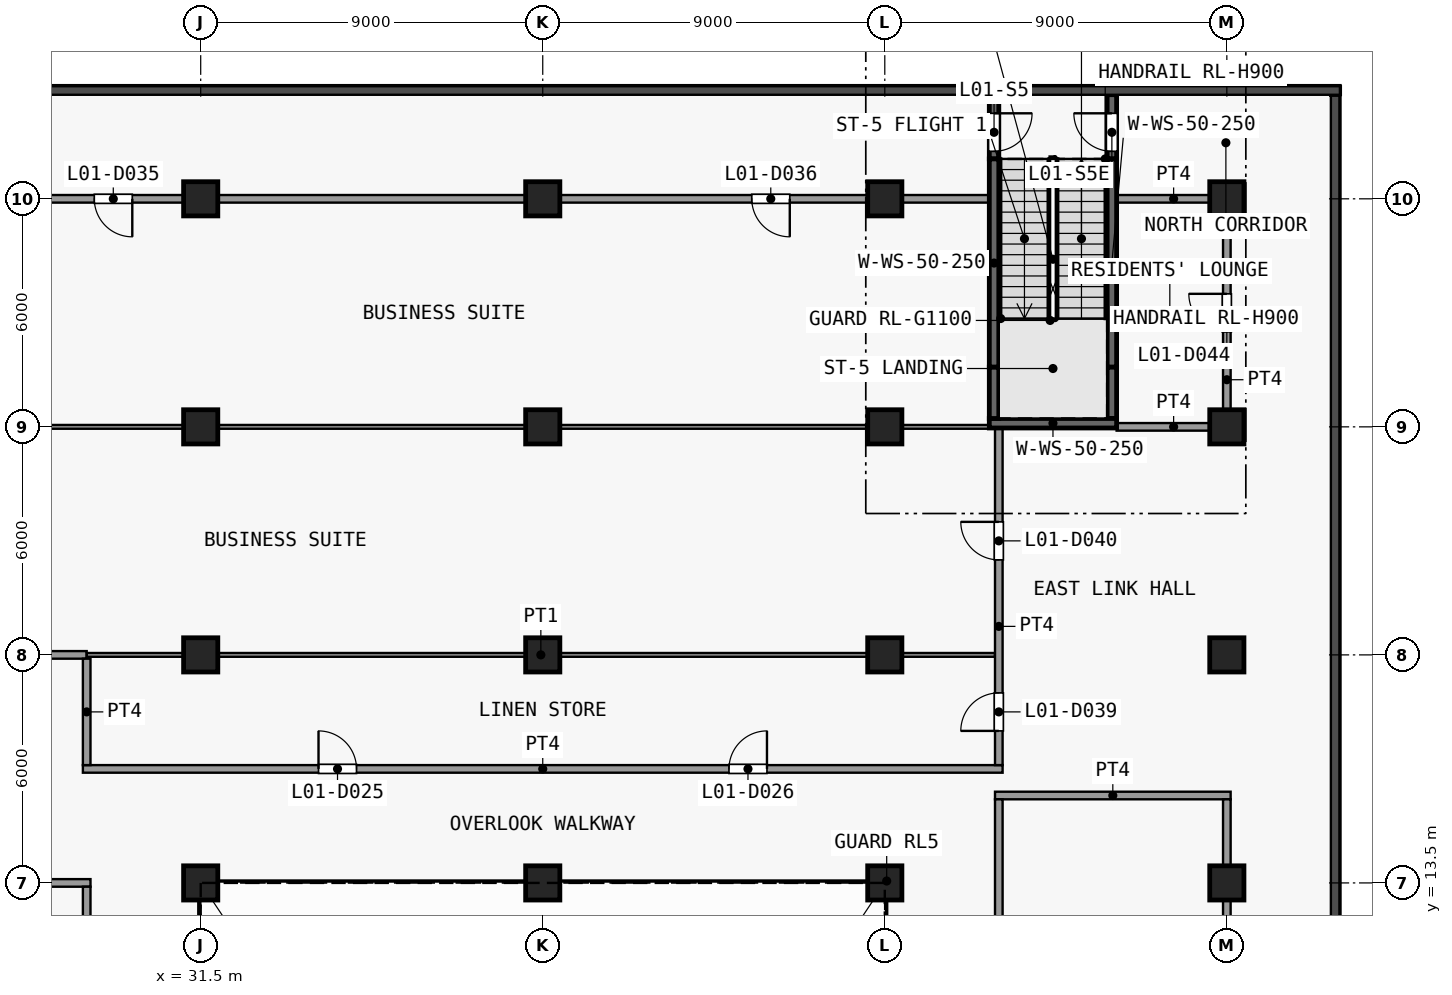
"""IFC4 building model, lengths in metres.
Left out: names, types, materials, properties, quantities, classifications, styles, units other than length and angle.
Written with IfcOpenShell. Run it as: python <this file> out.ifc"""

import sys

from ifc_helpers import new_model, si_unit, direction, frame, frame_2d, origin, origin_2d, place, context, subcontext, project, spatial, rectangle, extrude, element, fill, save


model = new_model("IFC4")
c1 = context("Model", 3, precision=1e-05, world=origin(), true_north=direction((0.0, 1.0)))
c2 = subcontext(c1, "Body", "Model", "MODEL_VIEW")
j1 = project(units=[si_unit("LENGTHUNIT", "METRE"), si_unit("PLANEANGLEUNIT", "RADIAN")], contexts=[c1])
p1 = place(None, origin())
s1 = spatial("IfcSite", under=j1, at=p1, CompositionType="ELEMENT")
p2 = place(p1, origin())
s2 = spatial("IfcBuilding", under=s1, at=p2, CompositionType="ELEMENT")
p3 = place(p2, frame((0.0, 0.0, 8.0)))
s3 = spatial("IfcBuildingStorey", under=s2, at=p3, CompositionType="ELEMENT", Elevation=8.0)
for number, where, z_axis, x_axis in (
    (1, (31.5, 13.5, 0.0), (0.0, 0.0, 1.0), (1.0, 0.0, 0.0)),
    (2, (31.5, 19.5, 0.0), (0.0, 0.0, 1.0), (1.0, 0.0, 0.0)),
    (3, (31.5, 25.5, 0.0), (0.0, 0.0, 1.0), (1.0, 0.0, 0.0)),
    (4, (31.5, 31.5, 0.0), (0.0, 0.0, 1.0), (1.0, 0.0, 0.0)),
    (5, (40.5, 13.5, 0.0), (0.0, 0.0, 1.0), (1.0, 0.0, 0.0)),
    (6, (40.5, 19.5, 0.0), (0.0, 0.0, 1.0), (1.0, 0.0, 0.0)),
    (7, (40.5, 25.5, 0.0), (0.0, 0.0, 1.0), (1.0, 0.0, 0.0)),
    (8, (40.5, 31.5, 0.0), (0.0, 0.0, 1.0), (1.0, 0.0, 0.0)),
    (9, (49.5, 13.5, 0.0), (0.0, 0.0, 1.0), (1.0, 0.0, 0.0)),
    (10, (49.5, 19.5, 0.0), (0.0, 0.0, 1.0), (1.0, 0.0, 0.0)),
    (11, (49.5, 25.5, 0.0), (0.0, 0.0, 1.0), (1.0, 0.0, 0.0)),
    (12, (49.5, 31.5, 0.0), (0.0, 0.0, 1.0), (1.0, 0.0, 0.0)),
    (13, (58.5, 13.5, 0.0), (0.0, 0.0, 1.0), (1.0, 0.0, 0.0)),
    (14, (58.5, 19.5, 0.0), (0.0, 0.0, 1.0), (1.0, 0.0, 0.0)),
    (15, (58.5, 25.5, 0.0), (0.0, 0.0, 1.0), (1.0, 0.0, 0.0)),
    (16, (58.5, 31.5, 0.0), (0.0, 0.0, 1.0), (1.0, 0.0, 0.0)),
):
    element("IfcColumn", number, at=place(p3, frame(where, z_axis=z_axis, x_axis=x_axis)), inside=s3, PredefinedType="COLUMN", context=c2, shape_type="SweptSolid", body=[
        extrude(rectangle(XDim=0.9, YDim=0.9, at=origin_2d()), origin(), (0.0, 0.0, 1.0), 5.5),
    ])
p4 = place(p3, frame((52.375, 34.24, 0.0), z_axis=(0.0, 0.0, 1.0), x_axis=(0.0, -1.0, 0.0)))
e17 = element("IfcWall", 17, at=p4, inside=s3, PredefinedType="SHEAR", context=c2, shape_type="SweptSolid", body=[
    extrude(rectangle(XDim=1.69, YDim=0.25, at=frame_2d((0.845, 0.0))), origin(), (0.0, 0.0, 1.0), 5.15),
])
p5 = place(p4, frame((0.49, 0.0, 0.0)))
e18 = element("IfcOpeningElement", 18, at=p5, cuts=e17, PredefinedType="OPENING", context=c2, shape_type="SweptSolid", body=[
    extrude(rectangle(XDim=1.0, YDim=2.1, at=frame_2d((0.5, 1.05))), frame((0.0, 0.135, 0.0), z_axis=(0.0, -1.0, 0.0), x_axis=(1.0, 0.0, 0.0)), (0.0, 0.0, 1.0), 0.27),
])
p6 = place(p3, frame((52.375, 27.07, 0.0), z_axis=(0.0, 0.0, 1.0), x_axis=(0.0, 1.0, 0.0)))
e19 = element("IfcWall", 19, at=p6, inside=s3, PredefinedType="SHEAR", context=c2, shape_type="SweptSolid", body=[
    extrude(rectangle(XDim=5.48, YDim=0.25, at=frame_2d((2.74, 0.0))), origin(), (0.0, 0.0, 1.0), 5.15),
])
p7 = place(p3, frame((52.375, 25.72, 0.0), z_axis=(0.0, 0.0, 1.0), x_axis=(0.0, 1.0, 0.0)))
e20 = element("IfcWall", 20, at=p7, inside=s3, PredefinedType="SHEAR", context=c2, shape_type="SweptSolid", body=[
    extrude(rectangle(XDim=1.35, YDim=0.25, at=frame_2d((0.675, 0.0))), origin(), (0.0, 0.0, 1.0), 5.15),
])
p8 = place(p3, frame((55.475, 32.55, 0.0), z_axis=(0.0, 0.0, 1.0), x_axis=(0.0, 1.0, 0.0)))
e21 = element("IfcWall", 21, at=p8, inside=s3, PredefinedType="SHEAR", context=c2, shape_type="SweptSolid", body=[
    extrude(rectangle(XDim=1.69, YDim=0.25, at=frame_2d((0.845, 0.0))), origin(), (0.0, 0.0, 1.0), 5.15),
])
p9 = place(p8, frame((0.2, 0.0, 0.0)))
e22 = element("IfcOpeningElement", 22, at=p9, cuts=e21, PredefinedType="OPENING", context=c2, shape_type="SweptSolid", body=[
    extrude(rectangle(XDim=1.0, YDim=2.1, at=frame_2d((0.5, 1.05))), frame((0.0, 0.135, 0.0), z_axis=(0.0, -1.0, 0.0), x_axis=(1.0, 0.0, 0.0)), (0.0, 0.0, 1.0), 0.27),
])
p10 = place(p3, frame((55.475, 27.07, 0.0), z_axis=(0.0, 0.0, 1.0), x_axis=(0.0, 1.0, 0.0)))
e23 = element("IfcWall", 23, at=p10, inside=s3, PredefinedType="SHEAR", context=c2, shape_type="SweptSolid", body=[
    extrude(rectangle(XDim=5.48, YDim=0.25, at=frame_2d((2.74, 0.0))), origin(), (0.0, 0.0, 1.0), 5.15),
])
p11 = place(p3, frame((55.475, 25.72, 0.0), z_axis=(0.0, 0.0, 1.0), x_axis=(0.0, 1.0, 0.0)))
e24 = element("IfcWall", 24, at=p11, inside=s3, PredefinedType="SHEAR", context=c2, shape_type="SweptSolid", body=[
    extrude(rectangle(XDim=1.35, YDim=0.25, at=frame_2d((0.675, 0.0))), origin(), (0.0, 0.0, 1.0), 5.15),
])
p12 = place(p3, frame((52.25, 25.595, 0.0), z_axis=(0.0, 0.0, 1.0), x_axis=(1.0, 0.0, 0.0)))
e25 = element("IfcWall", 25, at=p12, inside=s3, PredefinedType="SHEAR", context=c2, shape_type="SweptSolid", body=[
    extrude(rectangle(XDim=3.35, YDim=0.25, at=frame_2d((1.675, 0.0))), origin(), (0.0, 0.0, 1.0), 5.15),
])
p13 = place(p3, frame((20.3, 13.5, 0.0), z_axis=(0.0, 0.0, 1.0), x_axis=(1.0, 0.0, 0.0)))
e26 = element("IfcWall", 26, at=p13, inside=s3, PredefinedType="PARTITIONING", context=c2, shape_type="SweptSolid", body=[
    extrude(rectangle(XDim=8.3, YDim=0.2, at=frame_2d((4.15, 0.0))), origin(), (0.0, 0.0, 1.0), 5.15),
])
p14 = place(p13, frame((3.7, 0.0, 0.0)))
e27 = element("IfcOpeningElement", 27, at=p14, cuts=e26, PredefinedType="OPENING", context=c2, shape_type="SweptSolid", body=[
    extrude(rectangle(XDim=1.0, YDim=2.1, at=frame_2d((0.5, 1.05))), frame((0.0, 0.11, 0.0), z_axis=(0.0, -1.0, 0.0), x_axis=(1.0, 0.0, 0.0)), (0.0, 0.0, 1.0), 0.22),
])
p15 = place(p3, frame((52.4, 15.8, 0.0), z_axis=(0.0, 0.0, 1.0), x_axis=(1.0, 0.0, 0.0)))
e28 = element("IfcWall", 28, at=p15, inside=s3, PredefinedType="PARTITIONING", context=c2, shape_type="SweptSolid", body=[
    extrude(rectangle(XDim=6.2, YDim=0.2, at=frame_2d((3.1, 0.0))), origin(), (0.0, 0.0, 1.0), 5.15),
])
p16 = place(p3, frame((28.4, 16.5, 0.0), z_axis=(0.0, 0.0, 1.0), x_axis=(1.0, 0.0, 0.0)))
e29 = element("IfcWall", 29, at=p16, inside=s3, PredefinedType="PARTITIONING", context=c2, shape_type="SweptSolid", body=[
    extrude(rectangle(XDim=24.2, YDim=0.2, at=frame_2d((12.1, 0.0))), origin(), (0.0, 0.0, 1.0), 5.15),
])
p17 = place(p16, frame((6.2, 0.0, 0.0)))
e30 = element("IfcOpeningElement", 30, at=p17, cuts=e29, PredefinedType="OPENING", context=c2, shape_type="SweptSolid", body=[
    extrude(rectangle(XDim=1.0, YDim=2.1, at=frame_2d((0.5, 1.05))), frame((0.0, 0.11, 0.0), z_axis=(0.0, -1.0, 0.0), x_axis=(1.0, 0.0, 0.0)), (0.0, 0.0, 1.0), 0.22),
])
p18 = place(p16, frame((17.0, 0.0, 0.0)))
e31 = element("IfcOpeningElement", 31, at=p18, cuts=e29, PredefinedType="OPENING", context=c2, shape_type="SweptSolid", body=[
    extrude(rectangle(XDim=1.0, YDim=2.1, at=frame_2d((0.5, 1.05))), frame((0.0, 0.11, 0.0), z_axis=(0.0, -1.0, 0.0), x_axis=(1.0, 0.0, 0.0)), (0.0, 0.0, 1.0), 0.22),
])
p19 = place(p3, frame((-31.6, 19.5, 0.0), z_axis=(0.0, 0.0, 1.0), x_axis=(1.0, 0.0, 0.0)))
e32 = element("IfcWall", 32, at=p19, inside=s3, PredefinedType="PARTITIONING", context=c2, shape_type="SweptSolid", body=[
    extrude(rectangle(XDim=60.1, YDim=0.2, at=frame_2d((30.05, 0.0))), origin(), (0.0, 0.0, 1.0), 5.15),
])
p20 = place(p19, frame((10.0, 0.0, 0.0)))
e33 = element("IfcOpeningElement", 33, at=p20, cuts=e32, PredefinedType="OPENING", context=c2, shape_type="SweptSolid", body=[
    extrude(rectangle(XDim=1.0, YDim=2.1, at=frame_2d((0.5, 1.05))), frame((0.0, 0.11, 0.0), z_axis=(0.0, -1.0, 0.0), x_axis=(1.0, 0.0, 0.0)), (0.0, 0.0, 1.0), 0.22),
])
p21 = place(p19, frame((37.0, 0.0, 0.0)))
e34 = element("IfcOpeningElement", 34, at=p21, cuts=e32, PredefinedType="OPENING", context=c2, shape_type="SweptSolid", body=[
    extrude(rectangle(XDim=1.0, YDim=2.1, at=frame_2d((0.5, 1.05))), frame((0.0, 0.11, 0.0), z_axis=(0.0, -1.0, 0.0), x_axis=(1.0, 0.0, 0.0)), (0.0, 0.0, 1.0), 0.22),
])
p22 = place(p19, frame((49.0, 0.0, 0.0)))
e35 = element("IfcOpeningElement", 35, at=p22, cuts=e32, PredefinedType="OPENING", context=c2, shape_type="SweptSolid", body=[
    extrude(rectangle(XDim=1.0, YDim=2.1, at=frame_2d((0.5, 1.05))), frame((0.0, 0.11, 0.0), z_axis=(0.0, -1.0, 0.0), x_axis=(1.0, 0.0, 0.0)), (0.0, 0.0, 1.0), 0.22),
])
p23 = place(p19, frame((56.9, 0.0, 0.0)))
e36 = element("IfcOpeningElement", 36, at=p23, cuts=e32, PredefinedType="OPENING", context=c2, shape_type="SweptSolid", body=[
    extrude(rectangle(XDim=1.0, YDim=2.1, at=frame_2d((0.5, 1.05))), frame((0.0, 0.11, 0.0), z_axis=(0.0, -1.0, 0.0), x_axis=(1.0, 0.0, 0.0)), (0.0, 0.0, 1.0), 0.22),
])
p24 = place(p3, frame((28.5, 19.5, 0.0), z_axis=(0.0, 0.0, 1.0), x_axis=(1.0, 0.0, 0.0)))
e37 = element("IfcWall", 37, at=p24, inside=s3, PredefinedType="PARTITIONING", context=c2, shape_type="SweptSolid", body=[
    extrude(rectangle(XDim=23.9, YDim=0.1, at=frame_2d((11.95, 0.0))), origin(), (0.0, 0.0, 1.0), 5.15),
])
p25 = place(p3, frame((55.6, 25.5, 0.0), z_axis=(0.0, 0.0, 1.0), x_axis=(1.0, 0.0, 0.0)))
e38 = element("IfcWall", 38, at=p25, inside=s3, PredefinedType="PARTITIONING", context=c2, shape_type="SweptSolid", body=[
    extrude(rectangle(XDim=3.0, YDim=0.2, at=frame_2d((1.5, 0.0))), origin(), (0.0, 0.0, 1.0), 5.15),
])
p26 = place(p3, frame((-25.9, 25.5, 0.0), z_axis=(0.0, 0.0, 1.0), x_axis=(1.0, 0.0, 0.0)))
e39 = element("IfcWall", 39, at=p26, inside=s3, PredefinedType="PARTITIONING", context=c2, shape_type="SweptSolid", body=[
    extrude(rectangle(XDim=78.15, YDim=0.1, at=frame_2d((39.075, 0.0))), origin(), (0.0, 0.0, 1.0), 5.15),
])
p27 = place(p3, frame((-25.9, 31.5, 0.0), z_axis=(0.0, 0.0, 1.0), x_axis=(1.0, 0.0, 0.0)))
e40 = element("IfcWall", 40, at=p27, inside=s3, PredefinedType="PARTITIONING", context=c2, shape_type="SweptSolid", body=[
    extrude(rectangle(XDim=78.15, YDim=0.2, at=frame_2d((39.075, 0.0))), origin(), (0.0, 0.0, 1.0), 5.15),
])
p28 = place(p27, frame((6.9, 0.0, 0.0)))
e41 = element("IfcOpeningElement", 41, at=p28, cuts=e40, PredefinedType="OPENING", context=c2, shape_type="SweptSolid", body=[
    extrude(rectangle(XDim=1.8, YDim=2.1, at=frame_2d((0.9, 1.05))), frame((0.0, 0.11, 0.0), z_axis=(0.0, -1.0, 0.0), x_axis=(1.0, 0.0, 0.0)), (0.0, 0.0, 1.0), 0.22),
])
p29 = place(p27, frame((31.0, 0.0, 0.0)))
e42 = element("IfcOpeningElement", 42, at=p29, cuts=e40, PredefinedType="OPENING", context=c2, shape_type="SweptSolid", body=[
    extrude(rectangle(XDim=1.8, YDim=2.1, at=frame_2d((0.9, 1.05))), frame((0.0, 0.11, 0.0), z_axis=(0.0, -1.0, 0.0), x_axis=(1.0, 0.0, 0.0)), (0.0, 0.0, 1.0), 0.22),
])
p30 = place(p27, frame((40.8, 0.0, 0.0)))
e43 = element("IfcOpeningElement", 43, at=p30, cuts=e40, PredefinedType="OPENING", context=c2, shape_type="SweptSolid", body=[
    extrude(rectangle(XDim=1.0, YDim=2.1, at=frame_2d((0.5, 1.05))), frame((0.0, 0.11, 0.0), z_axis=(0.0, -1.0, 0.0), x_axis=(1.0, 0.0, 0.0)), (0.0, 0.0, 1.0), 0.22),
])
p31 = place(p27, frame((46.6, 0.0, 0.0)))
e44 = element("IfcOpeningElement", 44, at=p31, cuts=e40, PredefinedType="OPENING", context=c2, shape_type="SweptSolid", body=[
    extrude(rectangle(XDim=1.0, YDim=2.1, at=frame_2d((0.5, 1.05))), frame((0.0, 0.11, 0.0), z_axis=(0.0, -1.0, 0.0), x_axis=(1.0, 0.0, 0.0)), (0.0, 0.0, 1.0), 0.22),
])
p32 = place(p27, frame((54.6, 0.0, 0.0)))
e45 = element("IfcOpeningElement", 45, at=p32, cuts=e40, PredefinedType="OPENING", context=c2, shape_type="SweptSolid", body=[
    extrude(rectangle(XDim=1.0, YDim=2.1, at=frame_2d((0.5, 1.05))), frame((0.0, 0.11, 0.0), z_axis=(0.0, -1.0, 0.0), x_axis=(1.0, 0.0, 0.0)), (0.0, 0.0, 1.0), 0.22),
])
p33 = place(p27, frame((71.9, 0.0, 0.0)))
e46 = element("IfcOpeningElement", 46, at=p33, cuts=e40, PredefinedType="OPENING", context=c2, shape_type="SweptSolid", body=[
    extrude(rectangle(XDim=1.0, YDim=2.1, at=frame_2d((0.5, 1.05))), frame((0.0, 0.11, 0.0), z_axis=(0.0, -1.0, 0.0), x_axis=(1.0, 0.0, 0.0)), (0.0, 0.0, 1.0), 0.22),
])
p34 = place(p3, frame((55.6, 31.5, 0.0), z_axis=(0.0, 0.0, 1.0), x_axis=(1.0, 0.0, 0.0)))
e47 = element("IfcWall", 47, at=p34, inside=s3, PredefinedType="PARTITIONING", context=c2, shape_type="SweptSolid", body=[
    extrude(rectangle(XDim=3.0, YDim=0.2, at=frame_2d((1.5, 0.0))), origin(), (0.0, 0.0, 1.0), 5.15),
])
p35 = place(p3, frame((28.5, 1.6, 0.0), z_axis=(0.0, 0.0, 1.0), x_axis=(0.0, 1.0, 0.0)))
e48 = element("IfcWall", 48, at=p35, inside=s3, PredefinedType="PARTITIONING", context=c2, shape_type="SweptSolid", body=[
    extrude(rectangle(XDim=11.8, YDim=0.2, at=frame_2d((5.9, 0.0))), origin(), (0.0, 0.0, 1.0), 5.15),
])
p36 = place(p3, frame((28.5, 16.6, 0.0), z_axis=(0.0, 0.0, 1.0), x_axis=(0.0, 1.0, 0.0)))
e49 = element("IfcWall", 49, at=p36, inside=s3, PredefinedType="PARTITIONING", context=c2, shape_type="SweptSolid", body=[
    extrude(rectangle(XDim=2.8, YDim=0.2, at=frame_2d((1.4, 0.0))), origin(), (0.0, 0.0, 1.0), 5.15),
])
p37 = place(p3, frame((52.5, -16.5, 0.0), z_axis=(0.0, 0.0, 1.0), x_axis=(0.0, 1.0, 0.0)))
e50 = element("IfcWall", 50, at=p37, inside=s3, PredefinedType="PARTITIONING", context=c2, shape_type="SweptSolid", body=[
    extrude(rectangle(XDim=32.2, YDim=0.2, at=frame_2d((16.1, 0.0))), origin(), (0.0, 0.0, 1.0), 5.15),
])
p38 = place(p3, frame((52.5, 16.6, 0.0), z_axis=(0.0, 0.0, 1.0), x_axis=(0.0, 1.0, 0.0)))
e51 = element("IfcWall", 51, at=p38, inside=s3, PredefinedType="PARTITIONING", context=c2, shape_type="SweptSolid", body=[
    extrude(rectangle(XDim=8.87, YDim=0.2, at=frame_2d((4.435, 0.0))), origin(), (0.0, 0.0, 1.0), 5.15),
])
p39 = place(p38, frame((0.9, 0.0, 0.0)))
e52 = element("IfcOpeningElement", 52, at=p39, cuts=e51, PredefinedType="OPENING", context=c2, shape_type="SweptSolid", body=[
    extrude(rectangle(XDim=1.0, YDim=2.1, at=frame_2d((0.5, 1.05))), frame((0.0, 0.11, 0.0), z_axis=(0.0, -1.0, 0.0), x_axis=(1.0, 0.0, 0.0)), (0.0, 0.0, 1.0), 0.22),
])
p40 = place(p38, frame((5.4, 0.0, 0.0)))
e53 = element("IfcOpeningElement", 53, at=p40, cuts=e51, PredefinedType="OPENING", context=c2, shape_type="SweptSolid", body=[
    extrude(rectangle(XDim=1.0, YDim=2.1, at=frame_2d((0.5, 1.05))), frame((0.0, 0.11, 0.0), z_axis=(0.0, -1.0, 0.0), x_axis=(1.0, 0.0, 0.0)), (0.0, 0.0, 1.0), 0.22),
])
p41 = place(p3, frame((58.5, -31.4, 0.0), z_axis=(0.0, 0.0, 1.0), x_axis=(0.0, 1.0, 0.0)))
e54 = element("IfcWall", 54, at=p41, inside=s3, PredefinedType="PARTITIONING", context=c2, shape_type="SweptSolid", body=[
    extrude(rectangle(XDim=47.1, YDim=0.2, at=frame_2d((23.55, 0.0))), origin(), (0.0, 0.0, 1.0), 5.15),
])
p42 = place(p41, frame((7.3, 0.0, 0.0)))
e55 = element("IfcOpeningElement", 55, at=p42, cuts=e54, PredefinedType="OPENING", context=c2, shape_type="SweptSolid", body=[
    extrude(rectangle(XDim=1.0, YDim=2.1, at=frame_2d((0.5, 1.05))), frame((0.0, 0.11, 0.0), z_axis=(0.0, -1.0, 0.0), x_axis=(1.0, 0.0, 0.0)), (0.0, 0.0, 1.0), 0.22),
])
p43 = place(p41, frame((23.067, 0.0, 0.0)))
e56 = element("IfcOpeningElement", 56, at=p43, cuts=e54, PredefinedType="OPENING", context=c2, shape_type="SweptSolid", body=[
    extrude(rectangle(XDim=1.0, YDim=2.1, at=frame_2d((0.5, 1.05))), frame((0.0, 0.11, 0.0), z_axis=(0.0, -1.0, 0.0), x_axis=(1.0, 0.0, 0.0)), (0.0, 0.0, 1.0), 0.22),
])
p44 = place(p41, frame((39.433, 0.0, 0.0)))
e57 = element("IfcOpeningElement", 57, at=p44, cuts=e54, PredefinedType="OPENING", context=c2, shape_type="SweptSolid", body=[
    extrude(rectangle(XDim=1.0, YDim=2.1, at=frame_2d((0.5, 1.05))), frame((0.0, 0.11, 0.0), z_axis=(0.0, -1.0, 0.0), x_axis=(1.0, 0.0, 0.0)), (0.0, 0.0, 1.0), 0.22),
])
p45 = place(p3, frame((58.5, 25.6, 0.0), z_axis=(0.0, 0.0, 1.0), x_axis=(0.0, 1.0, 0.0)))
e58 = element("IfcWall", 58, at=p45, inside=s3, PredefinedType="PARTITIONING", context=c2, shape_type="SweptSolid", body=[
    extrude(rectangle(XDim=5.8, YDim=0.2, at=frame_2d((2.9, 0.0))), origin(), (0.0, 0.0, 1.0), 5.15),
])
p46 = place(p45, frame((2.4, 0.0, 0.0)))
e59 = element("IfcOpeningElement", 59, at=p46, cuts=e58, PredefinedType="OPENING", context=c2, shape_type="SweptSolid", body=[
    extrude(rectangle(XDim=1.0, YDim=2.1, at=frame_2d((0.5, 1.05))), frame((0.0, 0.11, 0.0), z_axis=(0.0, -1.0, 0.0), x_axis=(1.0, 0.0, 0.0)), (0.0, 0.0, 1.0), 0.22),
])
p47 = place(p5, origin())
e60 = element("IfcDoor", 60, at=p47, inside=s3, OperationType="SINGLE_SWING_LEFT", PredefinedType="DOOR", context=c2, shape_type="SweptSolid", body=[
    extrude(rectangle(XDim=1.0, YDim=2.1, at=frame_2d((0.5, 1.05))), frame((0.0, 0.025, 0.0), z_axis=(0.0, -1.0, 0.0), x_axis=(1.0, 0.0, 0.0)), (0.0, 0.0, 1.0), 0.05),
])
fill(e18, e60)
p48 = place(p9, origin())
e61 = element("IfcDoor", 61, at=p48, inside=s3, OperationType="SINGLE_SWING_RIGHT", PredefinedType="DOOR", context=c2, shape_type="SweptSolid", body=[
    extrude(rectangle(XDim=1.0, YDim=2.1, at=frame_2d((0.5, 1.05))), frame((0.0, 0.025, 0.0), z_axis=(0.0, -1.0, 0.0), x_axis=(1.0, 0.0, 0.0)), (0.0, 0.0, 1.0), 0.05),
])
fill(e22, e61)
p49 = place(p17, origin())
e62 = element("IfcDoor", 62, at=p49, inside=s3, OperationType="SINGLE_SWING_RIGHT", PredefinedType="DOOR", context=c2, shape_type="SweptSolid", body=[
    extrude(rectangle(XDim=1.0, YDim=2.1, at=frame_2d((0.5, 1.05))), frame((0.0, 0.025, 0.0), z_axis=(0.0, -1.0, 0.0), x_axis=(1.0, 0.0, 0.0)), (0.0, 0.0, 1.0), 0.05),
])
fill(e30, e62)
p50 = place(p18, origin())
e63 = element("IfcDoor", 63, at=p50, inside=s3, OperationType="SINGLE_SWING_LEFT", PredefinedType="DOOR", context=c2, shape_type="SweptSolid", body=[
    extrude(rectangle(XDim=1.0, YDim=2.1, at=frame_2d((0.5, 1.05))), frame((0.0, 0.025, 0.0), z_axis=(0.0, -1.0, 0.0), x_axis=(1.0, 0.0, 0.0)), (0.0, 0.0, 1.0), 0.05),
])
fill(e31, e63)
p51 = place(p32, origin())
e64 = element("IfcDoor", 64, at=p51, inside=s3, OperationType="SINGLE_SWING_RIGHT", PredefinedType="DOOR", context=c2, shape_type="SweptSolid", body=[
    extrude(rectangle(XDim=1.0, YDim=2.1, at=frame_2d((0.5, 1.05))), frame((0.0, 0.025, 0.0), z_axis=(0.0, -1.0, 0.0), x_axis=(1.0, 0.0, 0.0)), (0.0, 0.0, 1.0), 0.05),
])
fill(e45, e64)
p52 = place(p33, origin())
e65 = element("IfcDoor", 65, at=p52, inside=s3, OperationType="SINGLE_SWING_RIGHT", PredefinedType="DOOR", context=c2, shape_type="SweptSolid", body=[
    extrude(rectangle(XDim=1.0, YDim=2.1, at=frame_2d((0.5, 1.05))), frame((0.0, 0.025, 0.0), z_axis=(0.0, -1.0, 0.0), x_axis=(1.0, 0.0, 0.0)), (0.0, 0.0, 1.0), 0.05),
])
fill(e46, e65)
p53 = place(p39, origin())
e66 = element("IfcDoor", 66, at=p53, inside=s3, OperationType="SINGLE_SWING_RIGHT", PredefinedType="DOOR", context=c2, shape_type="SweptSolid", body=[
    extrude(rectangle(XDim=1.0, YDim=2.1, at=frame_2d((0.5, 1.05))), frame((0.0, 0.025, 0.0), z_axis=(0.0, -1.0, 0.0), x_axis=(1.0, 0.0, 0.0)), (0.0, 0.0, 1.0), 0.05),
])
fill(e52, e66)
p54 = place(p40, origin())
e67 = element("IfcDoor", 67, at=p54, inside=s3, OperationType="SINGLE_SWING_LEFT", PredefinedType="DOOR", context=c2, shape_type="SweptSolid", body=[
    extrude(rectangle(XDim=1.0, YDim=2.1, at=frame_2d((0.5, 1.05))), frame((0.0, 0.025, 0.0), z_axis=(0.0, -1.0, 0.0), x_axis=(1.0, 0.0, 0.0)), (0.0, 0.0, 1.0), 0.05),
])
fill(e53, e67)
p55 = place(p46, origin())
e68 = element("IfcDoor", 68, at=p55, inside=s3, OperationType="SINGLE_SWING_LEFT", PredefinedType="DOOR", context=c2, shape_type="SweptSolid", body=[
    extrude(rectangle(XDim=1.0, YDim=2.1, at=frame_2d((0.5, 1.05))), frame((0.0, 0.025, 0.0), z_axis=(0.0, -1.0, 0.0), x_axis=(1.0, 0.0, 0.0)), (0.0, 0.0, 1.0), 0.05),
])
fill(e59, e68)
save(model, sys.argv[1])
